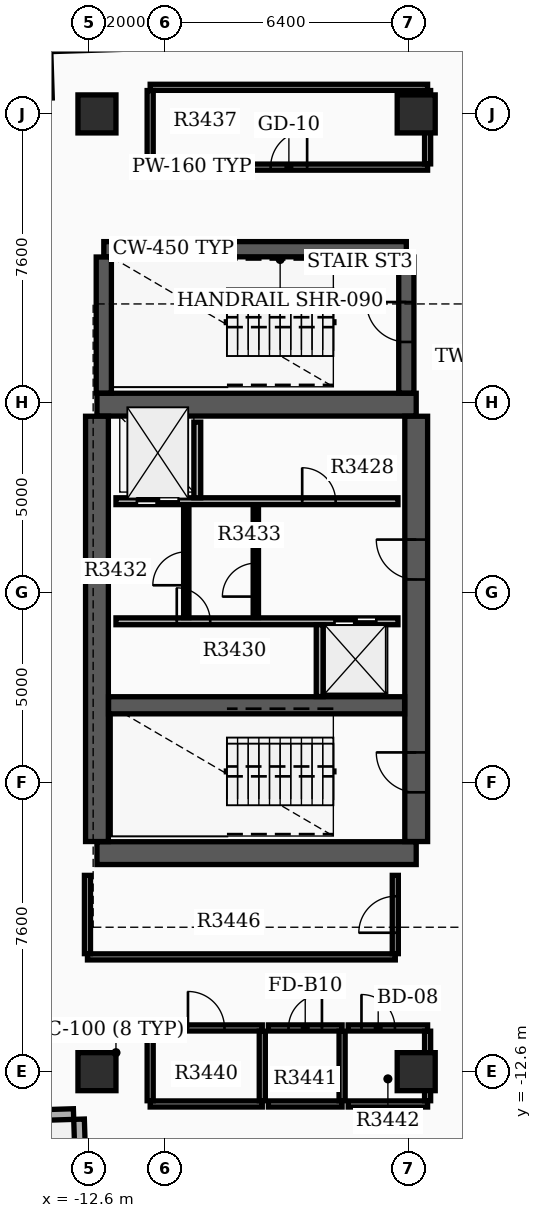
"""IFC4 building model, lengths in metres.
Left out: names, types, materials, properties, quantities, classifications, styles, units other than length and angle.
Written with IfcOpenShell. Run it as: python <this file> out.ifc"""

import sys

from ifc_helpers import new_model, si_unit, direction, frame, frame_2d, origin, origin_2d, place, context, subcontext, project, spatial, rectangle, extrude, element, fill, save


model = new_model("IFC4")
c1 = context("Model", 3, precision=1e-05, world=origin(), true_north=direction((0.0, 1.0)))
c2 = subcontext(c1, "Body", "Model", "MODEL_VIEW")
j1 = project(units=[si_unit("LENGTHUNIT", "METRE"), si_unit("PLANEANGLEUNIT", "RADIAN")], contexts=[c1])
p1 = place(None, origin())
s1 = spatial("IfcSite", under=j1, at=p1, CompositionType="ELEMENT")
p2 = place(p1, origin())
s2 = spatial("IfcBuilding", under=s1, at=p2, CompositionType="ELEMENT")
p3 = place(p2, frame((0.0, 0.0, 216.9)))
s3 = spatial("IfcBuildingStorey", under=s2, at=p3, CompositionType="ELEMENT", Elevation=216.9)
for number, where, z_axis, x_axis in (
    (1, (-12.4, -6.85, 0.0), (0.0, 0.0, 1.0), (1.0, 0.0, 0.0)),
    (2, (-12.4, 4.95, 0.0), (0.0, 0.0, 1.0), (1.0, 0.0, 0.0)),
):
    element("IfcWall", number, at=place(p3, frame(where, z_axis=z_axis, x_axis=x_axis)), inside=s3, PredefinedType="SHEAR", context=c2, shape_type="SweptSolid", body=[
        extrude(rectangle(XDim=8.4, YDim=0.6, at=frame_2d((4.2, 0.0))), origin(), (0.0, 0.0, 1.0), 3.7),
    ])
p4 = place(p3, frame((-12.4, -6.545, 0.0), z_axis=(0.0, 0.0, 1.0), x_axis=(0.0, 1.0, 0.0)))
e3 = element("IfcWall", 3, at=p4, inside=s3, PredefinedType="SHEAR", context=c2, shape_type="SweptSolid", body=[
    extrude(rectangle(XDim=11.19, YDim=0.6, at=frame_2d((5.595, 0.0))), origin(), (0.0, 0.0, 1.0), 3.7),
])
p5 = place(p3, frame((-4.0, -6.545, 0.0), z_axis=(0.0, 0.0, 1.0), x_axis=(0.0, 1.0, 0.0)))
e4 = element("IfcWall", 4, at=p5, inside=s3, PredefinedType="SHEAR", context=c2, shape_type="SweptSolid", body=[
    extrude(rectangle(XDim=11.19, YDim=0.6, at=frame_2d((5.595, 0.0))), origin(), (0.0, 0.0, 1.0), 3.7),
])
p6 = place(p5, frame((1.295, 0.0, 0.0)))
e5 = element("IfcOpeningElement", 5, at=p6, cuts=e4, PredefinedType="OPENING", context=c2, shape_type="SweptSolid", body=[
    extrude(rectangle(XDim=1.05, YDim=2.15, at=frame_2d((0.525, 1.075))), frame((0.0, 0.31, 0.0), z_axis=(0.0, -1.0, 0.0), x_axis=(1.0, 0.0, 0.0)), (0.0, 0.0, 1.0), 0.62),
])
p7 = place(p5, frame((6.895, 0.0, 0.0)))
e6 = element("IfcOpeningElement", 6, at=p7, cuts=e4, PredefinedType="OPENING", context=c2, shape_type="SweptSolid", body=[
    extrude(rectangle(XDim=1.05, YDim=2.15, at=frame_2d((0.525, 1.075))), frame((0.0, 0.31, 0.0), z_axis=(0.0, -1.0, 0.0), x_axis=(1.0, 0.0, 0.0)), (0.0, 0.0, 1.0), 0.62),
])
p8 = place(p3, frame((-12.095, -2.96, 0.0), z_axis=(0.0, 0.0, 1.0), x_axis=(1.0, 0.0, 0.0)))
e7 = element("IfcWall", 7, at=p8, inside=s3, PredefinedType="SHEAR", context=c2, shape_type="SweptSolid", body=[
    extrude(rectangle(XDim=7.79, YDim=0.45, at=frame_2d((3.895, 0.0))), origin(), (0.0, 0.0, 1.0), 3.7),
])
p9 = place(p3, frame((-12.22, 9.04, 0.0), z_axis=(0.0, 0.0, 1.0), x_axis=(1.0, 0.0, 0.0)))
e8 = element("IfcWall", 8, at=p9, inside=s3, PredefinedType="SHEAR", context=c2, shape_type="SweptSolid", body=[
    extrude(rectangle(XDim=7.96, YDim=0.4, at=frame_2d((3.98, 0.0))), origin(), (0.0, 0.0, 1.0), 3.7),
])
p10 = place(p3, frame((-12.22, 5.255, 0.0), z_axis=(0.0, 0.0, 1.0), x_axis=(0.0, 1.0, 0.0)))
e9 = element("IfcWall", 9, at=p10, inside=s3, PredefinedType="SHEAR", context=c2, shape_type="SweptSolid", body=[
    extrude(rectangle(XDim=3.58, YDim=0.4, at=frame_2d((1.79, 0.0))), origin(), (0.0, 0.0, 1.0), 3.7),
])
p11 = place(p3, frame((-4.26, 5.255, 0.0), z_axis=(0.0, 0.0, 1.0), x_axis=(0.0, 1.0, 0.0)))
e10 = element("IfcWall", 10, at=p11, inside=s3, PredefinedType="SHEAR", context=c2, shape_type="SweptSolid", body=[
    extrude(rectangle(XDim=3.58, YDim=0.4, at=frame_2d((1.79, 0.0))), origin(), (0.0, 0.0, 1.0), 3.7),
])
p12 = place(p11, frame((1.345, 0.0, 0.0)))
e11 = element("IfcOpeningElement", 11, at=p12, cuts=e10, PredefinedType="OPENING", context=c2, shape_type="SweptSolid", body=[
    extrude(rectangle(XDim=1.05, YDim=2.15, at=frame_2d((0.525, 1.075))), frame((0.0, 0.21, 0.0), z_axis=(0.0, -1.0, 0.0), x_axis=(1.0, 0.0, 0.0)), (0.0, 0.0, 1.0), 0.42),
])
for number, where, z_axis, x_axis in (
    (12, (-12.4, -12.6, 0.0), (0.0, 0.0, 1.0), (1.0, 0.0, 0.0)),
    (13, (-12.4, 12.6, 0.0), (0.0, 0.0, 1.0), (1.0, 0.0, 0.0)),
    (14, (-4.0, -12.6, 0.0), (0.0, 0.0, 1.0), (1.0, 0.0, 0.0)),
    (15, (-4.0, 12.6, 0.0), (0.0, 0.0, 1.0), (1.0, 0.0, 0.0)),
):
    element("IfcColumn", number, at=place(p3, frame(where, z_axis=z_axis, x_axis=x_axis)), inside=s3, PredefinedType="COLUMN", context=c2, shape_type="SweptSolid", body=[
        extrude(rectangle(XDim=1.0, YDim=1.0, at=origin_2d()), origin(), (0.0, 0.0, 1.0), 3.9),
    ])
p13 = place(p3, frame((-14.235, -13.754, 0.0), z_axis=(0.0, 0.0, 1.0), x_axis=(0.999506398264, 0.031415916822, 0.0)))
e16 = element("IfcWall", 16, at=p13, inside=s3, PredefinedType="STANDARD", context=c2, shape_type="SweptSolid", body=[
    extrude(rectangle(XDim=1.22, YDim=0.28, at=frame_2d((0.61, 0.0))), origin(), (0.0, 0.0, 1.0), 3.18),
])
p14 = place(p3, frame((-12.871, -13.851, 0.0), z_axis=(0.0, 0.0, 1.0), x_axis=(0.031412596484, -0.999506502621, 0.0)))
e17 = element("IfcWall", 17, at=p14, inside=s3, PredefinedType="STANDARD", context=c2, shape_type="SweptSolid", body=[
    extrude(rectangle(XDim=1.5, YDim=0.28, at=frame_2d((0.75, 0.0))), origin(), (0.0, 0.0, 1.0), 3.18),
])
p15 = place(p3, frame((-11.9, 2.41, 0.0), z_axis=(0.0, 0.0, 1.0), x_axis=(1.0, 0.0, 0.0)))
e18 = element("IfcWall", 18, at=p15, inside=s3, PredefinedType="SOLIDWALL", context=c2, shape_type="SweptSolid", body=[
    extrude(rectangle(XDim=7.42, YDim=0.18, at=frame_2d((3.71, 0.0))), origin(), (0.0, 0.0, 1.0), 3.17),
])
p16 = place(p15, frame((0.55, 0.0, 0.0)))
e19 = element("IfcOpeningElement", 19, at=p16, cuts=e18, PredefinedType="OPENING", context=c2, shape_type="SweptSolid", body=[
    extrude(rectangle(XDim=1.1, YDim=2.15, at=frame_2d((0.55, 1.075))), frame((0.0, 0.1, 0.0), z_axis=(0.0, -1.0, 0.0), x_axis=(1.0, 0.0, 0.0)), (0.0, 0.0, 1.0), 0.2),
])
p17 = place(p15, frame((4.9, 0.0, 0.0)))
e20 = element("IfcOpeningElement", 20, at=p17, cuts=e18, PredefinedType="OPENING", context=c2, shape_type="SweptSolid", body=[
    extrude(rectangle(XDim=0.88, YDim=2.1, at=frame_2d((0.44, 1.05))), frame((0.0, 0.1, 0.0), z_axis=(0.0, -1.0, 0.0), x_axis=(1.0, 0.0, 0.0)), (0.0, 0.0, 1.0), 0.2),
])
p18 = place(p3, frame((-11.9, -0.75, 0.0), z_axis=(0.0, 0.0, 1.0), x_axis=(1.0, 0.0, 0.0)))
e21 = element("IfcWall", 21, at=p18, inside=s3, PredefinedType="SOLIDWALL", context=c2, shape_type="SweptSolid", body=[
    extrude(rectangle(XDim=7.42, YDim=0.18, at=frame_2d((3.71, 0.0))), origin(), (0.0, 0.0, 1.0), 3.17),
])
p19 = place(p18, frame((5.75, 0.0, 0.0)))
e22 = element("IfcOpeningElement", 22, at=p19, cuts=e21, PredefinedType="OPENING", context=c2, shape_type="SweptSolid", body=[
    extrude(rectangle(XDim=1.1, YDim=2.15, at=frame_2d((0.55, 1.075))), frame((0.0, 0.1, 0.0), z_axis=(0.0, -1.0, 0.0), x_axis=(1.0, 0.0, 0.0)), (0.0, 0.0, 1.0), 0.2),
])
p20 = place(p18, frame((1.6, 0.0, 0.0)))
e23 = element("IfcOpeningElement", 23, at=p20, cuts=e21, PredefinedType="OPENING", context=c2, shape_type="SweptSolid", body=[
    extrude(rectangle(XDim=0.88, YDim=2.1, at=frame_2d((0.44, 1.05))), frame((0.0, 0.1, 0.0), z_axis=(0.0, -1.0, 0.0), x_axis=(1.0, 0.0, 0.0)), (0.0, 0.0, 1.0), 0.2),
])
p21 = place(p3, frame((-9.76, 2.5, 0.0), z_axis=(0.0, 0.0, 1.0), x_axis=(0.0, 1.0, 0.0)))
e24 = element("IfcWall", 24, at=p21, inside=s3, PredefinedType="SOLIDWALL", context=c2, shape_type="SweptSolid", body=[
    extrude(rectangle(XDim=1.99, YDim=0.18, at=frame_2d((0.995, 0.0))), origin(), (0.0, 0.0, 1.0), 3.17),
])
p22 = place(p3, frame((-6.54, -2.73, 0.0), z_axis=(0.0, 0.0, 1.0), x_axis=(0.0, 1.0, 0.0)))
e25 = element("IfcWall", 25, at=p22, inside=s3, PredefinedType="SOLIDWALL", context=c2, shape_type="SweptSolid", body=[
    extrude(rectangle(XDim=1.89, YDim=0.18, at=frame_2d((0.945, 0.0))), origin(), (0.0, 0.0, 1.0), 3.17),
])
p23 = place(p3, frame((-8.22, -0.65, 0.0), z_axis=(0.0, 0.0, 1.0), x_axis=(0.0, 1.0, 0.0)))
e26 = element("IfcWall", 26, at=p23, inside=s3, PredefinedType="SOLIDWALL", context=c2, shape_type="SweptSolid", body=[
    extrude(rectangle(XDim=2.96, YDim=0.14, at=frame_2d((1.48, 0.0))), origin(), (0.0, 0.0, 1.0), 3.17),
])
p24 = place(p23, frame((0.55, 0.0, 0.0)))
e27 = element("IfcOpeningElement", 27, at=p24, cuts=e26, PredefinedType="OPENING", context=c2, shape_type="SweptSolid", body=[
    extrude(rectangle(XDim=0.88, YDim=2.1, at=frame_2d((0.44, 1.05))), frame((0.0, 0.08, 0.0), z_axis=(0.0, -1.0, 0.0), x_axis=(1.0, 0.0, 0.0)), (0.0, 0.0, 1.0), 0.16),
])
p25 = place(p3, frame((-10.05, -0.652, 0.0), z_axis=(0.0, 0.0, 1.0), x_axis=(0.0, 1.0, 0.0)))
e28 = element("IfcWall", 28, at=p25, inside=s3, PredefinedType="PARTITIONING", context=c2, shape_type="SweptSolid", body=[
    extrude(rectangle(XDim=2.962, YDim=0.14, at=frame_2d((1.481, 0.0))), origin(), (0.0, 0.0, 1.0), 3.17),
])
p26 = place(p25, frame((0.85, 0.0, 0.0)))
e29 = element("IfcOpeningElement", 29, at=p26, cuts=e28, PredefinedType="OPENING", context=c2, shape_type="SweptSolid", body=[
    extrude(rectangle(XDim=0.88, YDim=2.1, at=frame_2d((0.44, 1.05))), frame((0.0, 0.08, 0.0), z_axis=(0.0, -1.0, 0.0), x_axis=(1.0, 0.0, 0.0)), (0.0, 0.0, 1.0), 0.16),
])
p27 = place(p3, frame((-11.0, 11.2, 0.0), z_axis=(0.0, 0.0, 1.0), x_axis=(1.0, 0.0, 0.0)))
e30 = element("IfcWall", 30, at=p27, inside=s3, PredefinedType="PARTITIONING", context=c2, shape_type="SweptSolid", body=[
    extrude(rectangle(XDim=7.3, YDim=0.16, at=frame_2d((3.65, 0.0))), origin(), (0.0, 0.0, 1.0), 3.17),
])
p28 = place(p27, frame((3.17, 0.0, 0.0)))
e31 = element("IfcOpeningElement", 31, at=p28, cuts=e30, PredefinedType="OPENING", context=c2, shape_type="SweptSolid", body=[
    extrude(rectangle(XDim=0.96, YDim=2.15, at=frame_2d((0.48, 1.075))), frame((0.0, 0.09, 0.0), z_axis=(0.0, -1.0, 0.0), x_axis=(1.0, 0.0, 0.0)), (0.0, 0.0, 1.0), 0.18),
])
p29 = place(p3, frame((-11.0, 13.3, 0.0), z_axis=(0.0, 0.0, 1.0), x_axis=(1.0, 0.0, 0.0)))
e32 = element("IfcWall", 32, at=p29, inside=s3, PredefinedType="PARTITIONING", context=c2, shape_type="SweptSolid", body=[
    extrude(rectangle(XDim=7.3, YDim=0.16, at=frame_2d((3.65, 0.0))), origin(), (0.0, 0.0, 1.0), 3.17),
])
for number, where, z_axis, x_axis in (
    (33, (-11.0, 11.285, 0.0), (0.0, 0.0, 1.0), (0.0, 1.0, 0.0)),
    (34, (-3.7, 11.285, 0.0), (0.0, 0.0, 1.0), (0.0, 1.0, 0.0)),
):
    element("IfcWall", number, at=place(p3, frame(where, z_axis=z_axis, x_axis=x_axis)), inside=s3, PredefinedType="PARTITIONING", context=c2, shape_type="SweptSolid", body=[
        extrude(rectangle(XDim=1.93, YDim=0.16, at=frame_2d((0.965, 0.0))), origin(), (0.0, 0.0, 1.0), 3.17),
    ])
p30 = place(p3, frame((-11.0, -13.45, 0.0), z_axis=(0.0, 0.0, 1.0), x_axis=(1.0, 0.0, 0.0)))
e35 = element("IfcWall", 35, at=p30, inside=s3, PredefinedType="PARTITIONING", context=c2, shape_type="SweptSolid", body=[
    extrude(rectangle(XDim=2.95, YDim=0.16, at=frame_2d((1.475, 0.0))), origin(), (0.0, 0.0, 1.0), 3.17),
])
p31 = place(p3, frame((-11.0, -11.45, 0.0), z_axis=(0.0, 0.0, 1.0), x_axis=(1.0, 0.0, 0.0)))
e36 = element("IfcWall", 36, at=p31, inside=s3, PredefinedType="PARTITIONING", context=c2, shape_type="SweptSolid", body=[
    extrude(rectangle(XDim=2.95, YDim=0.16, at=frame_2d((1.475, 0.0))), origin(), (0.0, 0.0, 1.0), 3.17),
])
p32 = place(p31, frame((0.995, 0.0, 0.0)))
e37 = element("IfcOpeningElement", 37, at=p32, cuts=e36, PredefinedType="OPENING", context=c2, shape_type="SweptSolid", body=[
    extrude(rectangle(XDim=0.96, YDim=2.15, at=frame_2d((0.48, 1.075))), frame((0.0, 0.09, 0.0), z_axis=(0.0, -1.0, 0.0), x_axis=(1.0, 0.0, 0.0)), (0.0, 0.0, 1.0), 0.18),
])
for number, where, z_axis, x_axis in (
    (38, (-11.0, -13.365, 0.0), (0.0, 0.0, 1.0), (0.0, 1.0, 0.0)),
    (39, (-8.05, -13.365, 0.0), (0.0, 0.0, 1.0), (0.0, 1.0, 0.0)),
):
    element("IfcWall", number, at=place(p3, frame(where, z_axis=z_axis, x_axis=x_axis)), inside=s3, PredefinedType="PARTITIONING", context=c2, shape_type="SweptSolid", body=[
        extrude(rectangle(XDim=1.83, YDim=0.16, at=frame_2d((0.915, 0.0))), origin(), (0.0, 0.0, 1.0), 3.17),
    ])
p33 = place(p3, frame((-7.89, -13.45, 0.0), z_axis=(0.0, 0.0, 1.0), x_axis=(1.0, 0.0, 0.0)))
e40 = element("IfcWall", 40, at=p33, inside=s3, PredefinedType="PARTITIONING", context=c2, shape_type="SweptSolid", body=[
    extrude(rectangle(XDim=1.94, YDim=0.16, at=frame_2d((0.97, 0.0))), origin(), (0.0, 0.0, 1.0), 3.17),
])
p34 = place(p3, frame((-7.89, -11.45, 0.0), z_axis=(0.0, 0.0, 1.0), x_axis=(1.0, 0.0, 0.0)))
e41 = element("IfcWall", 41, at=p34, inside=s3, PredefinedType="PARTITIONING", context=c2, shape_type="SweptSolid", body=[
    extrude(rectangle(XDim=1.94, YDim=0.16, at=frame_2d((0.97, 0.0))), origin(), (0.0, 0.0, 1.0), 3.17),
])
p35 = place(p34, frame((0.53, 0.0, 0.0)))
e42 = element("IfcOpeningElement", 42, at=p35, cuts=e41, PredefinedType="OPENING", context=c2, shape_type="SweptSolid", body=[
    extrude(rectangle(XDim=0.88, YDim=2.1, at=frame_2d((0.44, 1.05))), frame((0.0, 0.09, 0.0), z_axis=(0.0, -1.0, 0.0), x_axis=(1.0, 0.0, 0.0)), (0.0, 0.0, 1.0), 0.18),
])
p36 = place(p3, frame((-5.95, -13.365, 0.0), z_axis=(0.0, 0.0, 1.0), x_axis=(0.0, 1.0, 0.0)))
e43 = element("IfcWall", 43, at=p36, inside=s3, PredefinedType="PARTITIONING", context=c2, shape_type="SweptSolid", body=[
    extrude(rectangle(XDim=1.83, YDim=0.16, at=frame_2d((0.915, 0.0))), origin(), (0.0, 0.0, 1.0), 3.17),
])
p37 = place(p3, frame((-5.79, -13.45, 0.0), z_axis=(0.0, 0.0, 1.0), x_axis=(1.0, 0.0, 0.0)))
e44 = element("IfcWall", 44, at=p37, inside=s3, PredefinedType="PARTITIONING", context=c2, shape_type="SweptSolid", body=[
    extrude(rectangle(XDim=2.09, YDim=0.16, at=frame_2d((1.045, 0.0))), origin(), (0.0, 0.0, 1.0), 3.17),
])
p38 = place(p3, frame((-5.79, -11.45, 0.0), z_axis=(0.0, 0.0, 1.0), x_axis=(1.0, 0.0, 0.0)))
e45 = element("IfcWall", 45, at=p38, inside=s3, PredefinedType="PARTITIONING", context=c2, shape_type="SweptSolid", body=[
    extrude(rectangle(XDim=2.09, YDim=0.16, at=frame_2d((1.045, 0.0))), origin(), (0.0, 0.0, 1.0), 3.17),
])
p39 = place(p38, frame((0.35, 0.0, 0.0)))
e46 = element("IfcOpeningElement", 46, at=p39, cuts=e45, PredefinedType="OPENING", context=c2, shape_type="SweptSolid", body=[
    extrude(rectangle(XDim=0.88, YDim=2.15, at=frame_2d((0.44, 1.075))), frame((0.0, 0.09, 0.0), z_axis=(0.0, -1.0, 0.0), x_axis=(1.0, 0.0, 0.0)), (0.0, 0.0, 1.0), 0.18),
])
p40 = place(p3, frame((-3.7, -13.365, 0.0), z_axis=(0.0, 0.0, 1.0), x_axis=(0.0, 1.0, 0.0)))
e47 = element("IfcWall", 47, at=p40, inside=s3, PredefinedType="PARTITIONING", context=c2, shape_type="SweptSolid", body=[
    extrude(rectangle(XDim=1.83, YDim=0.16, at=frame_2d((0.915, 0.0))), origin(), (0.0, 0.0, 1.0), 3.17),
])
p41 = place(p3, frame((-12.65, -9.58, 0.0), z_axis=(0.0, 0.0, 1.0), x_axis=(1.0, 0.0, 0.0)))
e48 = element("IfcWall", 48, at=p41, inside=s3, PredefinedType="PARTITIONING", context=c2, shape_type="SweptSolid", body=[
    extrude(rectangle(XDim=8.1, YDim=0.16, at=frame_2d((4.05, 0.0))), origin(), (0.0, 0.0, 1.0), 3.17),
])
p42 = place(p3, frame((-12.65, -9.495, 0.0), z_axis=(0.0, 0.0, 1.0), x_axis=(0.0, 1.0, 0.0)))
e49 = element("IfcWall", 49, at=p42, inside=s3, PredefinedType="PARTITIONING", context=c2, shape_type="SweptSolid", body=[
    extrude(rectangle(XDim=2.06, YDim=0.16, at=frame_2d((1.03, 0.0))), origin(), (0.0, 0.0, 1.0), 3.17),
])
p43 = place(p3, frame((-4.55, -9.495, 0.0), z_axis=(0.0, 0.0, 1.0), x_axis=(0.0, 1.0, 0.0)))
e50 = element("IfcWall", 50, at=p43, inside=s3, PredefinedType="PARTITIONING", context=c2, shape_type="SweptSolid", body=[
    extrude(rectangle(XDim=2.06, YDim=0.16, at=frame_2d((1.03, 0.0))), origin(), (0.0, 0.0, 1.0), 3.17),
])
p44 = place(p43, frame((0.55, 0.0, 0.0)))
e51 = element("IfcOpeningElement", 51, at=p44, cuts=e50, PredefinedType="OPENING", context=c2, shape_type="SweptSolid", body=[
    extrude(rectangle(XDim=0.96, YDim=2.15, at=frame_2d((0.48, 1.075))), frame((0.0, 0.09, 0.0), z_axis=(0.0, -1.0, 0.0), x_axis=(1.0, 0.0, 0.0)), (0.0, 0.0, 1.0), 0.18),
])
p45 = place(p6, origin())
e52 = element("IfcDoor", 52, at=p45, inside=s3, OperationType="SINGLE_SWING_RIGHT", PredefinedType="DOOR", context=c2, shape_type="SweptSolid", body=[
    extrude(rectangle(XDim=1.05, YDim=2.15, at=frame_2d((0.525, 1.075))), frame((0.0, 0.025, 0.0), z_axis=(0.0, -1.0, 0.0), x_axis=(1.0, 0.0, 0.0)), (0.0, 0.0, 1.0), 0.05),
])
fill(e5, e52)
p46 = place(p7, origin())
e53 = element("IfcDoor", 53, at=p46, inside=s3, OperationType="SINGLE_SWING_RIGHT", PredefinedType="DOOR", context=c2, shape_type="SweptSolid", body=[
    extrude(rectangle(XDim=1.05, YDim=2.15, at=frame_2d((0.525, 1.075))), frame((0.0, 0.025, 0.0), z_axis=(0.0, -1.0, 0.0), x_axis=(1.0, 0.0, 0.0)), (0.0, 0.0, 1.0), 0.05),
])
fill(e6, e53)
p47 = place(p12, origin())
e54 = element("IfcDoor", 54, at=p47, inside=s3, OperationType="SINGLE_SWING_RIGHT", PredefinedType="DOOR", context=c2, shape_type="SweptSolid", body=[
    extrude(rectangle(XDim=1.05, YDim=2.15, at=frame_2d((0.525, 1.075))), frame((0.0, 0.025, 0.0), z_axis=(0.0, -1.0, 0.0), x_axis=(1.0, 0.0, 0.0)), (0.0, 0.0, 1.0), 0.05),
])
fill(e11, e54)
p48 = place(p16, origin())
e55 = element("IfcDoor", 55, at=p48, inside=s3, OperationType="DOUBLE_DOOR_SLIDING", PredefinedType="DOOR", context=c2, shape_type="SweptSolid", body=[
    extrude(rectangle(XDim=1.1, YDim=2.15, at=frame_2d((0.55, 1.075))), frame((0.0, 0.025, 0.0), z_axis=(0.0, -1.0, 0.0), x_axis=(1.0, 0.0, 0.0)), (0.0, 0.0, 1.0), 0.05),
])
fill(e19, e55)
p49 = place(p19, origin())
e56 = element("IfcDoor", 56, at=p49, inside=s3, OperationType="DOUBLE_DOOR_SLIDING", PredefinedType="DOOR", context=c2, shape_type="SweptSolid", body=[
    extrude(rectangle(XDim=1.1, YDim=2.15, at=frame_2d((0.55, 1.075))), frame((0.0, 0.025, 0.0), z_axis=(0.0, -1.0, 0.0), x_axis=(1.0, 0.0, 0.0)), (0.0, 0.0, 1.0), 0.05),
])
fill(e22, e56)
p50 = place(p17, origin())
e57 = element("IfcDoor", 57, at=p50, inside=s3, OperationType="SINGLE_SWING_LEFT", PredefinedType="DOOR", context=c2, shape_type="SweptSolid", body=[
    extrude(rectangle(XDim=0.88, YDim=2.1, at=frame_2d((0.44, 1.05))), frame((0.0, 0.025, 0.0), z_axis=(0.0, -1.0, 0.0), x_axis=(1.0, 0.0, 0.0)), (0.0, 0.0, 1.0), 0.05),
])
fill(e20, e57)
p51 = place(p20, origin())
e58 = element("IfcDoor", 58, at=p51, inside=s3, OperationType="SINGLE_SWING_LEFT", PredefinedType="DOOR", context=c2, shape_type="SweptSolid", body=[
    extrude(rectangle(XDim=0.88, YDim=2.1, at=frame_2d((0.44, 1.05))), frame((0.0, 0.025, 0.0), z_axis=(0.0, -1.0, 0.0), x_axis=(1.0, 0.0, 0.0)), (0.0, 0.0, 1.0), 0.05),
])
fill(e23, e58)
p52 = place(p24, origin())
e59 = element("IfcDoor", 59, at=p52, inside=s3, OperationType="SINGLE_SWING_LEFT", PredefinedType="DOOR", context=c2, shape_type="SweptSolid", body=[
    extrude(rectangle(XDim=0.88, YDim=2.1, at=frame_2d((0.44, 1.05))), frame((0.0, 0.025, 0.0), z_axis=(0.0, -1.0, 0.0), x_axis=(1.0, 0.0, 0.0)), (0.0, 0.0, 1.0), 0.05),
])
fill(e27, e59)
p53 = place(p26, origin())
e60 = element("IfcDoor", 60, at=p53, inside=s3, OperationType="SINGLE_SWING_LEFT", PredefinedType="DOOR", context=c2, shape_type="SweptSolid", body=[
    extrude(rectangle(XDim=0.88, YDim=2.1, at=frame_2d((0.44, 1.05))), frame((0.0, 0.025, 0.0), z_axis=(0.0, -1.0, 0.0), x_axis=(1.0, 0.0, 0.0)), (0.0, 0.0, 1.0), 0.05),
])
fill(e29, e60)
p54 = place(p28, origin())
e61 = element("IfcDoor", 61, at=p54, inside=s3, OperationType="SINGLE_SWING_RIGHT", PredefinedType="DOOR", context=c2, shape_type="SweptSolid", body=[
    extrude(rectangle(XDim=0.96, YDim=2.15, at=frame_2d((0.48, 1.075))), frame((0.0, 0.025, 0.0), z_axis=(0.0, -1.0, 0.0), x_axis=(1.0, 0.0, 0.0)), (0.0, 0.0, 1.0), 0.05),
])
fill(e31, e61)
p55 = place(p32, origin())
e62 = element("IfcDoor", 62, at=p55, inside=s3, OperationType="SINGLE_SWING_LEFT", PredefinedType="DOOR", context=c2, shape_type="SweptSolid", body=[
    extrude(rectangle(XDim=0.96, YDim=2.15, at=frame_2d((0.48, 1.075))), frame((0.0, 0.025, 0.0), z_axis=(0.0, -1.0, 0.0), x_axis=(1.0, 0.0, 0.0)), (0.0, 0.0, 1.0), 0.05),
])
fill(e37, e62)
p56 = place(p35, origin())
e63 = element("IfcDoor", 63, at=p56, inside=s3, OperationType="SINGLE_SWING_RIGHT", PredefinedType="DOOR", context=c2, shape_type="SweptSolid", body=[
    extrude(rectangle(XDim=0.88, YDim=2.1, at=frame_2d((0.44, 1.05))), frame((0.0, 0.025, 0.0), z_axis=(0.0, -1.0, 0.0), x_axis=(1.0, 0.0, 0.0)), (0.0, 0.0, 1.0), 0.05),
])
fill(e42, e63)
p57 = place(p39, origin())
e64 = element("IfcDoor", 64, at=p57, inside=s3, OperationType="SINGLE_SWING_LEFT", PredefinedType="DOOR", context=c2, shape_type="SweptSolid", body=[
    extrude(rectangle(XDim=0.88, YDim=2.15, at=frame_2d((0.44, 1.075))), frame((0.0, 0.025, 0.0), z_axis=(0.0, -1.0, 0.0), x_axis=(1.0, 0.0, 0.0)), (0.0, 0.0, 1.0), 0.05),
])
fill(e46, e64)
p58 = place(p44, origin())
e65 = element("IfcDoor", 65, at=p58, inside=s3, OperationType="SINGLE_SWING_LEFT", PredefinedType="DOOR", context=c2, shape_type="SweptSolid", body=[
    extrude(rectangle(XDim=0.96, YDim=2.15, at=frame_2d((0.48, 1.075))), frame((0.0, 0.025, 0.0), z_axis=(0.0, -1.0, 0.0), x_axis=(1.0, 0.0, 0.0)), (0.0, 0.0, 1.0), 0.05),
])
fill(e51, e65)
save(model, sys.argv[1])
